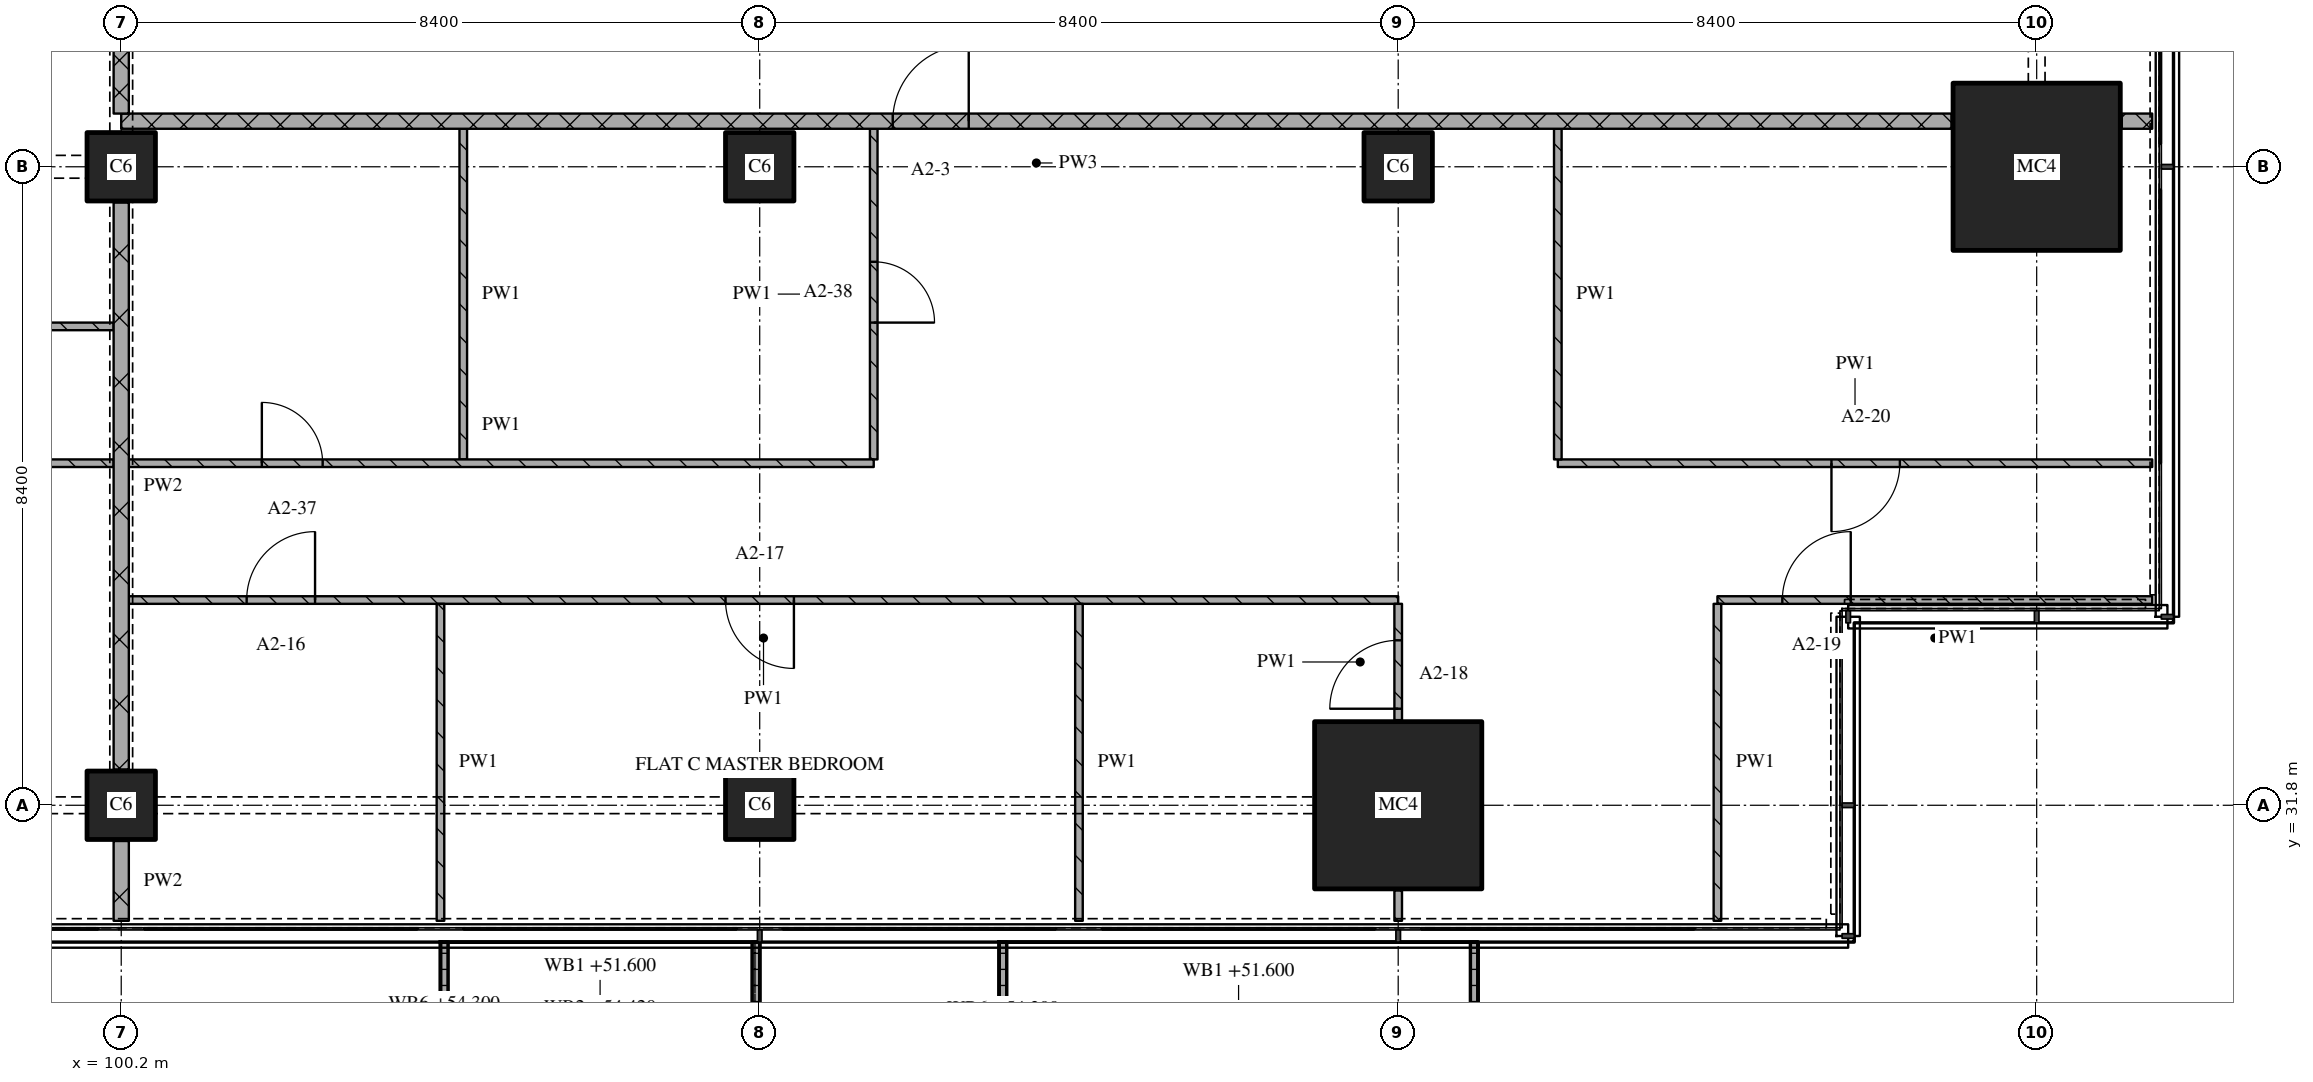
"""IFC4 building model, lengths in metres.
Left out: names, types, materials, properties, quantities, classifications, styles, units other than length and angle.
Written with IfcOpenShell. Run it as: python <this file> out.ifc"""

import sys

from ifc_helpers import new_model, si_unit, direction, frame, frame_2d, origin, origin_2d, place, context, subcontext, project, spatial, polyline, rectangle, outline, extrude, element, fill, save


model = new_model("IFC4")
c1 = context("Model", 3, precision=1e-05, world=origin(), true_north=direction((0.0, 1.0)))
c2 = subcontext(c1, "Body", "Model", "MODEL_VIEW")
j1 = project(units=[si_unit("LENGTHUNIT", "METRE"), si_unit("PLANEANGLEUNIT", "RADIAN")], contexts=[c1])
p1 = place(None, origin())
s1 = spatial("IfcSite", under=j1, at=p1, CompositionType="ELEMENT")
p2 = place(p1, origin())
s2 = spatial("IfcBuilding", under=s1, at=p2, CompositionType="ELEMENT")
p3 = place(p2, frame((0.0, 0.0, 51.6)))
s3 = spatial("IfcBuildingStorey", under=s2, at=p3, CompositionType="ELEMENT", Elevation=51.6)
for number, where, z_axis, x_axis in (
    (1, (100.2, 31.8, 0.0), (0.0, 0.0, 1.0), (1.0, 0.0, 0.0)),
    (2, (100.2, 40.2, 0.0), (0.0, 0.0, 1.0), (1.0, 0.0, 0.0)),
    (3, (108.6, 31.8, 0.0), (0.0, 0.0, 1.0), (1.0, 0.0, 0.0)),
    (4, (108.6, 40.2, 0.0), (0.0, 0.0, 1.0), (1.0, 0.0, 0.0)),
):
    element("IfcColumn", number, at=place(p3, frame(where, z_axis=z_axis, x_axis=x_axis)), inside=s3, PredefinedType="COLUMN", context=c2, shape_type="SweptSolid", body=[
        extrude(rectangle(XDim=0.9, YDim=0.9, at=origin_2d()), origin(), (0.0, 0.0, 1.0), 3.6),
    ])
p4 = place(p3, frame((117.0, 31.8, 0.0), z_axis=(0.0, 0.0, 1.0), x_axis=(1.0, 0.0, 0.0)))
e5 = element("IfcColumn", 5, at=p4, inside=s3, PredefinedType="COLUMN", context=c2, shape_type="SweptSolid", body=[
    extrude(rectangle(XDim=2.2, YDim=2.2, at=origin_2d()), origin(), (0.0, 0.0, 1.0), 3.6),
])
p5 = place(p3, frame((117.0, 40.2, 0.0), z_axis=(0.0, 0.0, 1.0), x_axis=(1.0, 0.0, 0.0)))
e6 = element("IfcColumn", 6, at=p5, inside=s3, PredefinedType="COLUMN", context=c2, shape_type="SweptSolid", body=[
    extrude(rectangle(XDim=0.9, YDim=0.9, at=origin_2d()), origin(), (0.0, 0.0, 1.0), 3.6),
])
p6 = place(p3, frame((125.4, 40.2, 0.0), z_axis=(0.0, 0.0, 1.0), x_axis=(1.0, 0.0, 0.0)))
e7 = element("IfcColumn", 7, at=p6, inside=s3, PredefinedType="COLUMN", context=c2, shape_type="SweptSolid", body=[
    extrude(rectangle(XDim=2.2, YDim=2.2, at=origin_2d()), origin(), (0.0, 0.0, 1.0), 3.6),
])
p7 = place(p3, origin())
e8 = element("IfcWall", 8, at=p7, inside=s3, PredefinedType="SOLIDWALL", context=c2, shape_type="SweptSolid", body=[
    extrude(outline(polyline([(104.4, 30.0), (104.5, 30.0), (104.5, 28.367), (108.5, 28.367), (108.5, 30.0), (108.6, 30.0), (108.6, 28.267), (104.4, 28.267), (104.4, 30.0)])), origin(), (0.0, 0.0, 1.0), 1.0),
])
p8 = place(p3, origin())
e9 = element("IfcWall", 9, at=p8, inside=s3, PredefinedType="SOLIDWALL", context=c2, shape_type="SweptSolid", body=[
    extrude(outline(polyline([(111.75, 30.0), (111.85, 30.0), (111.85, 28.233), (117.95, 28.233), (117.95, 30.0), (118.05, 30.0), (118.05, 28.133), (111.75, 28.133), (111.75, 30.0)])), origin(), (0.0, 0.0, 1.0), 1.0),
])
p9 = place(p3, frame((117.0, 34.5, 0.0), z_axis=(0.0, 0.0, 1.0), x_axis=(-1.0, 0.0, 0.0)))
e10 = element("IfcWall", 10, at=p9, inside=s3, PredefinedType="PARTITIONING", context=c2, shape_type="SweptSolid", body=[
    extrude(rectangle(XDim=16.7, YDim=0.1, at=frame_2d((8.35, 0.0))), origin(), (0.0, 0.0, 1.0), 3.32),
])
p10 = place(p9, frame((7.95, 0.0, 0.0)))
e11 = element("IfcOpeningElement", 11, at=p10, cuts=e10, PredefinedType="OPENING", context=c2, shape_type="SweptSolid", body=[
    extrude(rectangle(XDim=0.9, YDim=2.1, at=frame_2d((0.45, 1.05))), frame((0.0, 0.06, 0.0), z_axis=(0.0, -1.0, 0.0), x_axis=(1.0, 0.0, 0.0)), (0.0, 0.0, 1.0), 0.12),
])
p11 = place(p9, frame((14.25, 0.0, 0.0)))
e12 = element("IfcOpeningElement", 12, at=p11, cuts=e10, PredefinedType="OPENING", context=c2, shape_type="SweptSolid", body=[
    extrude(rectangle(XDim=0.9, YDim=2.1, at=frame_2d((0.45, 1.05))), frame((0.0, 0.06, 0.0), z_axis=(0.0, -1.0, 0.0), x_axis=(1.0, 0.0, 0.0)), (0.0, 0.0, 1.0), 0.12),
])
p12 = place(p3, frame((126.92, 34.5, 0.0), z_axis=(0.0, 0.0, 1.0), x_axis=(-1.0, 0.0, 0.0)))
e13 = element("IfcWall", 13, at=p12, inside=s3, PredefinedType="PARTITIONING", context=c2, shape_type="SweptSolid", body=[
    extrude(rectangle(XDim=5.72, YDim=0.1, at=frame_2d((2.86, 0.0))), origin(), (0.0, 0.0, 1.0), 3.32),
])
p13 = place(p12, frame((3.966, 0.0, 0.0)))
e14 = element("IfcOpeningElement", 14, at=p13, cuts=e13, PredefinedType="OPENING", context=c2, shape_type="SweptSolid", body=[
    extrude(rectangle(XDim=0.9, YDim=2.1, at=frame_2d((0.45, 1.05))), frame((0.0, 0.06, 0.0), z_axis=(0.0, -1.0, 0.0), x_axis=(1.0, 0.0, 0.0)), (0.0, 0.0, 1.0), 0.12),
])
p14 = place(p3, frame((119.1, 36.3, 0.0), z_axis=(0.0, 0.0, 1.0), x_axis=(1.0, 0.0, 0.0)))
e15 = element("IfcWall", 15, at=p14, inside=s3, PredefinedType="PARTITIONING", context=c2, shape_type="SweptSolid", body=[
    extrude(rectangle(XDim=7.82, YDim=0.1, at=frame_2d((3.91, 0.0))), origin(), (0.0, 0.0, 1.0), 3.32),
])
p15 = place(p14, frame((3.6, 0.0, 0.0)))
e16 = element("IfcOpeningElement", 16, at=p15, cuts=e15, PredefinedType="OPENING", context=c2, shape_type="SweptSolid", body=[
    extrude(rectangle(XDim=0.9, YDim=2.1, at=frame_2d((0.45, 1.05))), frame((0.0, 0.06, 0.0), z_axis=(0.0, -1.0, 0.0), x_axis=(1.0, 0.0, 0.0)), (0.0, 0.0, 1.0), 0.12),
])
p16 = place(p3, frame((92.4, 38.1, 0.0), z_axis=(0.0, 0.0, 1.0), x_axis=(1.0, 0.0, 0.0)))
e17 = element("IfcWall", 17, at=p16, inside=s3, PredefinedType="PARTITIONING", context=c2, shape_type="SweptSolid", body=[
    extrude(rectangle(XDim=7.7, YDim=0.1, at=frame_2d((3.85, 0.0))), origin(), (0.0, 0.0, 1.0), 3.32),
])
p17 = place(p16, frame((5.75, 0.0, 0.0)))
e18 = element("IfcOpeningElement", 18, at=p17, cuts=e17, PredefinedType="OPENING", context=c2, shape_type="SweptSolid", body=[
    extrude(rectangle(XDim=0.8, YDim=2.1, at=frame_2d((0.4, 1.05))), frame((0.0, 0.06, 0.0), z_axis=(0.0, -1.0, 0.0), x_axis=(1.0, 0.0, 0.0)), (0.0, 0.0, 1.0), 0.12),
])
p18 = place(p3, frame((124.28, 40.8, 0.0), z_axis=(0.0, 0.0, 1.0), x_axis=(-1.0, 0.0, 0.0)))
e19 = element("IfcWall", 19, at=p18, inside=s3, PredefinedType="PARTITIONING", context=c2, shape_type="SweptSolid", body=[
    extrude(rectangle(XDim=24.08, YDim=0.2, at=frame_2d((12.04, 0.0))), origin(), (0.0, 0.0, 1.0), 3.32),
])
p19 = place(p18, frame((12.93, 0.0, 0.0)))
e20 = element("IfcOpeningElement", 20, at=p19, cuts=e19, PredefinedType="OPENING", context=c2, shape_type="SweptSolid", body=[
    extrude(rectangle(XDim=1.0, YDim=2.1, at=frame_2d((0.5, 1.05))), frame((0.0, 0.11, 0.0), z_axis=(0.0, -1.0, 0.0), x_axis=(1.0, 0.0, 0.0)), (0.0, 0.0, 1.0), 0.22),
])
p20 = place(p3, frame((126.52, 40.8, 0.0), z_axis=(0.0, 0.0, 1.0), x_axis=(1.0, 0.0, 0.0)))
e21 = element("IfcWall", 21, at=p20, inside=s3, PredefinedType="PARTITIONING", context=c2, shape_type="SweptSolid", body=[
    extrude(rectangle(XDim=0.4, YDim=0.2, at=frame_2d((0.2, 0.0))), origin(), (0.0, 0.0, 1.0), 3.32),
])
p21 = place(p3, frame((100.2, 43.1, 0.0), z_axis=(0.0, 0.0, 1.0), x_axis=(0.0, -1.0, 0.0)))
e22 = element("IfcWall", 22, at=p21, inside=s3, PredefinedType="PARTITIONING", context=c2, shape_type="SweptSolid", body=[
    extrude(rectangle(XDim=2.2, YDim=0.2, at=frame_2d((1.1, 0.0))), origin(), (0.0, 0.0, 1.0), 2.43),
])
p22 = place(p3, frame((100.2, 31.33, 0.0), z_axis=(0.0, 0.0, 1.0), x_axis=(0.0, -1.0, 0.0)))
e23 = element("IfcWall", 23, at=p22, inside=s3, PredefinedType="PARTITIONING", context=c2, shape_type="SweptSolid", body=[
    extrude(rectangle(XDim=1.05, YDim=0.2, at=frame_2d((0.525, 0.0))), origin(), (0.0, 0.0, 1.0), 3.32),
])
p23 = place(p3, frame((100.2, 39.73, 0.0), z_axis=(0.0, 0.0, 1.0), x_axis=(0.0, -1.0, 0.0)))
e24 = element("IfcWall", 24, at=p23, inside=s3, PredefinedType="PARTITIONING", context=c2, shape_type="SweptSolid", body=[
    extrude(rectangle(XDim=7.46, YDim=0.2, at=frame_2d((3.73, 0.0))), origin(), (0.0, 0.0, 1.0), 2.83),
])
p24 = place(p3, frame((104.4, 34.45, 0.0), z_axis=(0.0, 0.0, 1.0), x_axis=(0.0, -1.0, 0.0)))
e25 = element("IfcWall", 25, at=p24, inside=s3, PredefinedType="PARTITIONING", context=c2, shape_type="SweptSolid", body=[
    extrude(rectangle(XDim=4.17, YDim=0.1, at=frame_2d((2.085, 0.0))), origin(), (0.0, 0.0, 1.0), 3.32),
])
p25 = place(p3, frame((104.7, 40.7, 0.0), z_axis=(0.0, 0.0, 1.0), x_axis=(0.0, -1.0, 0.0)))
e26 = element("IfcWall", 26, at=p25, inside=s3, PredefinedType="PARTITIONING", context=c2, shape_type="SweptSolid", body=[
    extrude(rectangle(XDim=4.35, YDim=0.1, at=frame_2d((2.175, 0.0))), origin(), (0.0, 0.0, 1.0), 3.32),
])
p26 = place(p3, frame((110.1, 36.35, 0.0), z_axis=(0.0, 0.0, 1.0), x_axis=(0.0, 1.0, 0.0)))
e27 = element("IfcWall", 27, at=p26, inside=s3, PredefinedType="PARTITIONING", context=c2, shape_type="SweptSolid", body=[
    extrude(rectangle(XDim=4.35, YDim=0.1, at=frame_2d((2.175, 0.0))), origin(), (0.0, 0.0, 1.0), 3.32),
])
p27 = place(p26, frame((1.8, 0.0, 0.0)))
e28 = element("IfcOpeningElement", 28, at=p27, cuts=e27, PredefinedType="OPENING", context=c2, shape_type="SweptSolid", body=[
    extrude(rectangle(XDim=0.8, YDim=2.1, at=frame_2d((0.4, 1.05))), frame((0.0, 0.06, 0.0), z_axis=(0.0, -1.0, 0.0), x_axis=(1.0, 0.0, 0.0)), (0.0, 0.0, 1.0), 0.12),
])
p28 = place(p3, frame((112.8, 34.45, 0.0), z_axis=(0.0, 0.0, 1.0), x_axis=(0.0, -1.0, 0.0)))
e29 = element("IfcWall", 29, at=p28, inside=s3, PredefinedType="PARTITIONING", context=c2, shape_type="SweptSolid", body=[
    extrude(rectangle(XDim=4.17, YDim=0.1, at=frame_2d((2.085, 0.0))), origin(), (0.0, 0.0, 1.0), 3.32),
])
p29 = place(p3, frame((117.0, 30.68, 0.0), z_axis=(0.0, 0.0, 1.0), x_axis=(0.0, -1.0, 0.0)))
e30 = element("IfcWall", 30, at=p29, inside=s3, PredefinedType="PARTITIONING", context=c2, shape_type="SweptSolid", body=[
    extrude(rectangle(XDim=0.4, YDim=0.1, at=frame_2d((0.2, 0.0))), origin(), (0.0, 0.0, 1.0), 3.32),
])
p30 = place(p3, frame((117.0, 32.92, 0.0), z_axis=(0.0, 0.0, 1.0), x_axis=(0.0, 1.0, 0.0)))
e31 = element("IfcWall", 31, at=p30, inside=s3, PredefinedType="PARTITIONING", context=c2, shape_type="SweptSolid", body=[
    extrude(rectangle(XDim=1.53, YDim=0.1, at=frame_2d((0.765, 0.0))), origin(), (0.0, 0.0, 1.0), 3.32),
])
p31 = place(p30, frame((0.15, 0.0, 0.0)))
e32 = element("IfcOpeningElement", 32, at=p31, cuts=e31, PredefinedType="OPENING", context=c2, shape_type="SweptSolid", body=[
    extrude(rectangle(XDim=0.9, YDim=2.1, at=frame_2d((0.45, 1.05))), frame((0.0, 0.06, 0.0), z_axis=(0.0, -1.0, 0.0), x_axis=(1.0, 0.0, 0.0)), (0.0, 0.0, 1.0), 0.12),
])
p32 = place(p3, frame((119.1, 40.7, 0.0), z_axis=(0.0, 0.0, 1.0), x_axis=(0.0, -1.0, 0.0)))
e33 = element("IfcWall", 33, at=p32, inside=s3, PredefinedType="PARTITIONING", context=c2, shape_type="SweptSolid", body=[
    extrude(rectangle(XDim=4.35, YDim=0.1, at=frame_2d((2.175, 0.0))), origin(), (0.0, 0.0, 1.0), 3.32),
])
p33 = place(p3, frame((121.2, 34.45, 0.0), z_axis=(0.0, 0.0, 1.0), x_axis=(0.0, -1.0, 0.0)))
e34 = element("IfcWall", 34, at=p33, inside=s3, PredefinedType="PARTITIONING", context=c2, shape_type="SweptSolid", body=[
    extrude(rectangle(XDim=4.17, YDim=0.1, at=frame_2d((2.085, 0.0))), origin(), (0.0, 0.0, 1.0), 3.32),
])
p34 = place(p3, frame((100.1, 36.3, 0.0), z_axis=(0.0, 0.0, 1.0), x_axis=(-1.0, 0.0, 0.0)))
e35 = element("IfcWall", 35, at=p34, inside=s3, PredefinedType="PARTITIONING", context=c2, shape_type="SweptSolid", body=[
    extrude(rectangle(XDim=12.5, YDim=0.1, at=frame_2d((6.25, 0.0))), origin(), (0.0, 0.0, 1.0), 3.32),
])
p35 = place(p34, frame((1.55, 0.0, 0.0)))
e36 = element("IfcOpeningElement", 36, at=p35, cuts=e35, PredefinedType="OPENING", context=c2, shape_type="SweptSolid", body=[
    extrude(rectangle(XDim=0.9, YDim=2.1, at=frame_2d((0.45, 1.05))), frame((0.0, 0.06, 0.0), z_axis=(0.0, -1.0, 0.0), x_axis=(1.0, 0.0, 0.0)), (0.0, 0.0, 1.0), 0.12),
])
p36 = place(p34, frame((7.85, 0.0, 0.0)))
e37 = element("IfcOpeningElement", 37, at=p36, cuts=e35, PredefinedType="OPENING", context=c2, shape_type="SweptSolid", body=[
    extrude(rectangle(XDim=0.9, YDim=2.1, at=frame_2d((0.45, 1.05))), frame((0.0, 0.06, 0.0), z_axis=(0.0, -1.0, 0.0), x_axis=(1.0, 0.0, 0.0)), (0.0, 0.0, 1.0), 0.12),
])
p37 = place(p3, frame((100.3, 36.3, 0.0), z_axis=(0.0, 0.0, 1.0), x_axis=(1.0, 0.0, 0.0)))
e38 = element("IfcWall", 38, at=p37, inside=s3, PredefinedType="PARTITIONING", context=c2, shape_type="SweptSolid", body=[
    extrude(rectangle(XDim=9.8, YDim=0.1, at=frame_2d((4.9, 0.0))), origin(), (0.0, 0.0, 1.0), 3.32),
])
p38 = place(p37, frame((1.75, 0.0, 0.0)))
e39 = element("IfcOpeningElement", 39, at=p38, cuts=e38, PredefinedType="OPENING", context=c2, shape_type="SweptSolid", body=[
    extrude(rectangle(XDim=0.8, YDim=2.1, at=frame_2d((0.4, 1.05))), frame((0.0, 0.06, 0.0), z_axis=(0.0, -1.0, 0.0), x_axis=(1.0, 0.0, 0.0)), (0.0, 0.0, 1.0), 0.12),
])
p39 = place(p10, origin())
e40 = element("IfcDoor", 40, at=p39, inside=s3, OperationType="SINGLE_SWING_LEFT", PredefinedType="DOOR", context=c2, shape_type="SweptSolid", body=[
    extrude(rectangle(XDim=0.9, YDim=2.1, at=frame_2d((0.45, 1.05))), frame((0.0, 0.025, 0.0), z_axis=(0.0, -1.0, 0.0), x_axis=(1.0, 0.0, 0.0)), (0.0, 0.0, 1.0), 0.05),
])
fill(e11, e40)
p40 = place(p11, origin())
e41 = element("IfcDoor", 41, at=p40, inside=s3, OperationType="SINGLE_SWING_RIGHT", PredefinedType="DOOR", context=c2, shape_type="SweptSolid", body=[
    extrude(rectangle(XDim=0.9, YDim=2.1, at=frame_2d((0.45, 1.05))), frame((0.0, 0.025, 0.0), z_axis=(0.0, -1.0, 0.0), x_axis=(1.0, 0.0, 0.0)), (0.0, 0.0, 1.0), 0.05),
])
fill(e12, e41)
p41 = place(p13, origin())
e42 = element("IfcDoor", 42, at=p41, inside=s3, OperationType="SINGLE_SWING_RIGHT", PredefinedType="DOOR", context=c2, shape_type="SweptSolid", body=[
    extrude(rectangle(XDim=0.9, YDim=2.1, at=frame_2d((0.45, 1.05))), frame((0.0, 0.025, 0.0), z_axis=(0.0, -1.0, 0.0), x_axis=(1.0, 0.0, 0.0)), (0.0, 0.0, 1.0), 0.05),
])
fill(e14, e42)
p42 = place(p15, origin())
e43 = element("IfcDoor", 43, at=p42, inside=s3, OperationType="SINGLE_SWING_RIGHT", PredefinedType="DOOR", context=c2, shape_type="SweptSolid", body=[
    extrude(rectangle(XDim=0.9, YDim=2.1, at=frame_2d((0.45, 1.05))), frame((0.0, 0.025, 0.0), z_axis=(0.0, -1.0, 0.0), x_axis=(1.0, 0.0, 0.0)), (0.0, 0.0, 1.0), 0.05),
])
fill(e16, e43)
p43 = place(p19, origin())
e44 = element("IfcDoor", 44, at=p43, inside=s3, OperationType="SINGLE_SWING_RIGHT", PredefinedType="DOOR", context=c2, shape_type="SweptSolid", body=[
    extrude(rectangle(XDim=1.0, YDim=2.1, at=frame_2d((0.5, 1.05))), frame((0.0, 0.025, 0.0), z_axis=(0.0, -1.0, 0.0), x_axis=(1.0, 0.0, 0.0)), (0.0, 0.0, 1.0), 0.05),
])
fill(e20, e44)
p44 = place(p27, origin())
e45 = element("IfcDoor", 45, at=p44, inside=s3, OperationType="SINGLE_SWING_RIGHT", PredefinedType="DOOR", context=c2, shape_type="SweptSolid", body=[
    extrude(rectangle(XDim=0.8, YDim=2.1, at=frame_2d((0.4, 1.05))), frame((0.0, 0.025, 0.0), z_axis=(0.0, -1.0, 0.0), x_axis=(1.0, 0.0, 0.0)), (0.0, 0.0, 1.0), 0.05),
])
fill(e28, e45)
p45 = place(p31, origin())
e46 = element("IfcDoor", 46, at=p45, inside=s3, OperationType="SINGLE_SWING_LEFT", PredefinedType="DOOR", context=c2, shape_type="SweptSolid", body=[
    extrude(rectangle(XDim=0.9, YDim=2.1, at=frame_2d((0.45, 1.05))), frame((0.0, 0.025, 0.0), z_axis=(0.0, -1.0, 0.0), x_axis=(1.0, 0.0, 0.0)), (0.0, 0.0, 1.0), 0.05),
])
fill(e32, e46)
p46 = place(p38, origin())
e47 = element("IfcDoor", 47, at=p46, inside=s3, OperationType="SINGLE_SWING_LEFT", PredefinedType="DOOR", context=c2, shape_type="SweptSolid", body=[
    extrude(rectangle(XDim=0.8, YDim=2.1, at=frame_2d((0.4, 1.05))), frame((0.0, 0.025, 0.0), z_axis=(0.0, -1.0, 0.0), x_axis=(1.0, 0.0, 0.0)), (0.0, 0.0, 1.0), 0.05),
])
fill(e39, e47)
save(model, sys.argv[1])
